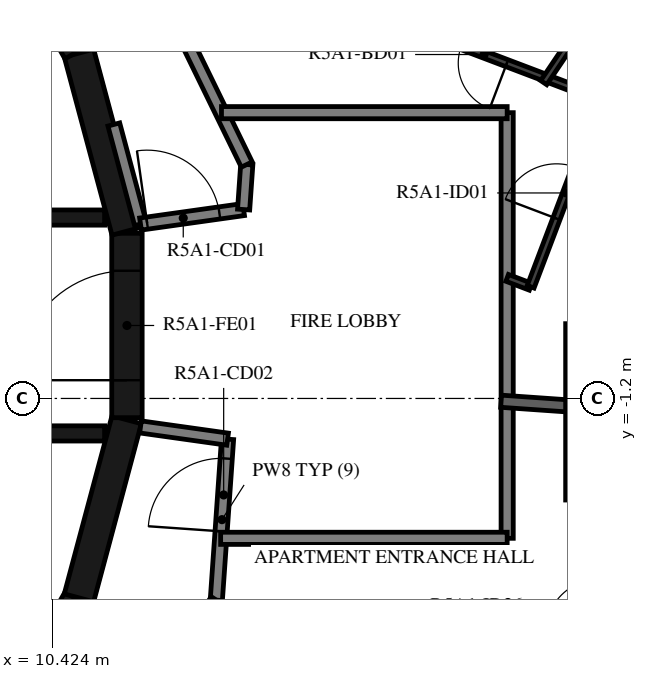
"""IFC4 building model, lengths in metres.
Left out: names, types, materials, properties, quantities, classifications, styles, units other than length and angle.
Written with IfcOpenShell. Run it as: python <this file> out.ifc"""

import sys

from ifc_helpers import new_model, si_unit, direction, frame, frame_2d, origin, place, context, subcontext, project, spatial, polyline, rectangle, outline, extrude, element, fill, save


model = new_model("IFC4")
c1 = context("Model", 3, precision=1e-05, world=origin(), true_north=direction((0.0, 1.0)))
c2 = subcontext(c1, "Body", "Model", "MODEL_VIEW")
j1 = project(units=[si_unit("LENGTHUNIT", "METRE"), si_unit("PLANEANGLEUNIT", "RADIAN")], contexts=[c1])
p1 = place(None, origin())
s1 = spatial("IfcSite", under=j1, at=p1, CompositionType="ELEMENT")
p2 = place(p1, origin())
s2 = spatial("IfcBuilding", under=s1, at=p2, CompositionType="ELEMENT")
p3 = place(p2, frame((0.0, 0.0, 191.9)))
s3 = spatial("IfcBuildingStorey", under=s2, at=p3, CompositionType="ELEMENT", Elevation=191.9)
for number, where, z_axis, x_axis in (
    (1, (9.329, -7.137, 0.0), (0.0, 0.0, 1.0), (0.5, 0.866, 0.0)),
    (2, (10.858, -4.479, 0.0), (0.0, 0.0, 1.0), (0.259, 0.966, 0.0)),
):
    element("IfcWall", number, at=place(p3, frame(where, z_axis=z_axis, x_axis=x_axis)), inside=s3, PredefinedType="SHEAR", context=c2, shape_type="SweptSolid", body=[
        extrude(rectangle(XDim=3.033, YDim=0.5, at=frame_2d((1.516, 0.0))), origin(), (0.0, 0.0, 1.0), 3.12),
    ])
p4 = place(p3, frame((11.647, -1.516, 0.0), z_axis=(0.0, 0.0, 1.0), x_axis=(0.0, 1.0, 0.0)))
e3 = element("IfcWall", 3, at=p4, inside=s3, PredefinedType="SHEAR", context=c2, shape_type="SweptSolid", body=[
    extrude(rectangle(XDim=3.033, YDim=0.5, at=frame_2d((1.516, 0.0))), origin(), (0.0, 0.0, 1.0), 3.12),
])
p5 = place(p4, frame((0.616, 0.0, 0.0)))
e4 = element("IfcOpeningElement", 4, at=p5, cuts=e3, PredefinedType="OPENING", context=c2, shape_type="SweptSolid", body=[
    extrude(rectangle(XDim=1.8, YDim=2.1, at=frame_2d((0.9, 1.05))), frame((0.0, 0.26, 0.0), z_axis=(0.0, -1.0, 0.0), x_axis=(1.0, 0.0, 0.0)), (0.0, 0.0, 1.0), 0.52),
])
for number, where, z_axis, x_axis in (
    (5, (11.643, 1.55, 0.0), (0.0, 0.0, 1.0), (-0.259, 0.966, 0.0)),
    (6, (10.845, 4.51, 0.0), (0.0, 0.0, 1.0), (-0.5, 0.866, 0.0)),
):
    element("IfcWall", number, at=place(p3, frame(where, z_axis=z_axis, x_axis=x_axis)), inside=s3, PredefinedType="SHEAR", context=c2, shape_type="SweptSolid", body=[
        extrude(rectangle(XDim=3.033, YDim=0.5, at=frame_2d((1.516, 0.0))), origin(), (0.0, 0.0, 1.0), 3.12),
    ])
p6 = place(p3, frame((3.35, 1.775, 0.0), z_axis=(0.0, 0.0, 1.0), x_axis=(1.0, 0.0, 0.0)))
e7 = element("IfcWall", 7, at=p6, inside=s3, PredefinedType="SHEAR", context=c2, shape_type="SweptSolid", body=[
    extrude(rectangle(XDim=7.93, YDim=0.25, at=frame_2d((3.965, 0.0))), origin(), (0.0, 0.0, 1.0), 3.12),
])
p7 = place(p6, frame((0.35, 0.0, 0.0)))
e8 = element("IfcOpeningElement", 8, at=p7, cuts=e7, PredefinedType="OPENING", context=c2, shape_type="SweptSolid", body=[
    extrude(rectangle(XDim=1.2, YDim=2.4, at=frame_2d((0.6, 1.2))), frame((0.0, 0.135, 0.0), z_axis=(0.0, -1.0, 0.0), x_axis=(1.0, 0.0, 0.0)), (0.0, 0.0, 1.0), 0.27),
])
p8 = place(p6, frame((2.5, 0.0, 0.0)))
e9 = element("IfcOpeningElement", 9, at=p8, cuts=e7, PredefinedType="OPENING", context=c2, shape_type="SweptSolid", body=[
    extrude(rectangle(XDim=1.2, YDim=2.4, at=frame_2d((0.6, 1.2))), frame((0.0, 0.135, 0.0), z_axis=(0.0, -1.0, 0.0), x_axis=(1.0, 0.0, 0.0)), (0.0, 0.0, 1.0), 0.27),
])
p9 = place(p6, frame((4.8, 0.0, 0.0)))
e10 = element("IfcOpeningElement", 10, at=p9, cuts=e7, PredefinedType="OPENING", context=c2, shape_type="SweptSolid", body=[
    extrude(rectangle(XDim=0.9, YDim=2.1, at=frame_2d((0.45, 1.05))), frame((0.0, 0.135, 0.0), z_axis=(0.0, -1.0, 0.0), x_axis=(1.0, 0.0, 0.0)), (0.0, 0.0, 1.0), 0.27),
])
p10 = place(p3, frame((3.35, -1.775, 0.0), z_axis=(0.0, 0.0, 1.0), x_axis=(1.0, 0.0, 0.0)))
e11 = element("IfcWall", 11, at=p10, inside=s3, PredefinedType="SHEAR", context=c2, shape_type="SweptSolid", body=[
    extrude(rectangle(XDim=7.93, YDim=0.25, at=frame_2d((3.965, 0.0))), origin(), (0.0, 0.0, 1.0), 3.12),
])
p11 = place(p10, frame((0.4, 0.0, 0.0)))
e12 = element("IfcOpeningElement", 12, at=p11, cuts=e11, PredefinedType="OPENING", context=c2, shape_type="SweptSolid", body=[
    extrude(rectangle(XDim=1.1, YDim=2.4, at=frame_2d((0.55, 1.2))), frame((0.0, 0.135, 0.0), z_axis=(0.0, -1.0, 0.0), x_axis=(1.0, 0.0, 0.0)), (0.0, 0.0, 1.0), 0.27),
])
p12 = place(p10, frame((2.55, 0.0, 0.0)))
e13 = element("IfcOpeningElement", 13, at=p12, cuts=e11, PredefinedType="OPENING", context=c2, shape_type="SweptSolid", body=[
    extrude(rectangle(XDim=1.1, YDim=2.4, at=frame_2d((0.55, 1.2))), frame((0.0, 0.135, 0.0), z_axis=(0.0, -1.0, 0.0), x_axis=(1.0, 0.0, 0.0)), (0.0, 0.0, 1.0), 0.27),
])
p13 = place(p10, frame((4.7, 0.0, 0.0)))
e14 = element("IfcOpeningElement", 14, at=p13, cuts=e11, PredefinedType="OPENING", context=c2, shape_type="SweptSolid", body=[
    extrude(rectangle(XDim=1.1, YDim=2.4, at=frame_2d((0.55, 1.2))), frame((0.0, 0.135, 0.0), z_axis=(0.0, -1.0, 0.0), x_axis=(1.0, 0.0, 0.0)), (0.0, 0.0, 1.0), 0.27),
])
p14 = place(p3, frame((11.87, 1.668, 0.0), z_axis=(0.0, 0.0, 1.0), x_axis=(-0.258836880648, 0.965921047093, 0.0)))
e15 = element("IfcWall", 15, at=p14, inside=s3, PredefinedType="STANDARD", context=c2, shape_type="SweptSolid", body=[
    extrude(rectangle(XDim=1.695, YDim=0.2, at=frame_2d((0.848, 0.0))), origin(), (0.0, 0.0, 1.0), 3.12),
])
p15 = place(p3, frame((11.87, 1.668, 0.0), z_axis=(0.0, 0.0, 1.0), x_axis=(0.990271931984, 0.139145609792, 0.0)))
e16 = element("IfcWall", 16, at=p15, inside=s3, PredefinedType="STANDARD", context=c2, shape_type="SweptSolid", body=[
    extrude(rectangle(XDim=1.712, YDim=0.2, at=frame_2d((0.856, 0.0))), origin(), (0.0, 0.0, 1.0), 3.12),
])
p16 = place(p15, frame((0.11, 0.0, 0.0)))
e17 = element("IfcOpeningElement", 17, at=p16, cuts=e16, PredefinedType="OPENING", context=c2, shape_type="SweptSolid", body=[
    extrude(rectangle(XDim=1.2, YDim=2.1, at=frame_2d((0.6, 1.05))), frame((0.0, 0.11, 0.0), z_axis=(0.0, -1.0, 0.0), x_axis=(1.0, 0.0, 0.0)), (0.0, 0.0, 1.0), 0.22),
])
p17 = place(p3, frame((13.566, 1.906, 0.0), z_axis=(0.0, 0.0, 1.0), x_axis=(0.07005495793, 0.997543133338, 0.0)))
e18 = element("IfcWall", 18, at=p17, inside=s3, PredefinedType="STANDARD", context=c2, shape_type="SweptSolid", body=[
    extrude(rectangle(XDim=0.742, YDim=0.2, at=frame_2d((0.371, 0.0))), origin(), (0.0, 0.0, 1.0), 3.12),
])
p18 = place(p3, frame((13.618, 2.647, 0.0), z_axis=(0.0, 0.0, 1.0), x_axis=(-0.438366026218, 0.898796543751, 0.0)))
e19 = element("IfcWall", 19, at=p18, inside=s3, PredefinedType="STANDARD", context=c2, shape_type="SweptSolid", body=[
    extrude(rectangle(XDim=7.181, YDim=0.2, at=frame_2d((3.591, 0.0))), origin(), (0.0, 0.0, 1.0), 3.12),
])
p19 = place(p3, frame((13.117, -4.517, 0.0), z_axis=(0.0, 0.0, 1.0), x_axis=(0.069736659613, 0.997565435601, 0.0)))
e20 = element("IfcWall", 20, at=p19, inside=s3, PredefinedType="STANDARD", context=c2, shape_type="SweptSolid", body=[
    extrude(rectangle(XDim=2.654, YDim=0.2, at=frame_2d((1.327, 0.0))), origin(), (0.0, 0.0, 1.0), 3.12),
])
p20 = place(p19, frame((1.134, 0.0, 0.0)))
e21 = element("IfcOpeningElement", 21, at=p20, cuts=e20, PredefinedType="OPENING", context=c2, shape_type="SweptSolid", body=[
    extrude(rectangle(XDim=1.2, YDim=2.1, at=frame_2d((0.6, 1.05))), frame((0.0, 0.11, 0.0), z_axis=(0.0, -1.0, 0.0), x_axis=(1.0, 0.0, 0.0)), (0.0, 0.0, 1.0), 0.22),
])
p21 = place(p3, frame((13.302, -1.869, 0.0), z_axis=(0.0, 0.0, 1.0), x_axis=(-0.990274397042, 0.13912806533, 0.0)))
e22 = element("IfcWall", 22, at=p21, inside=s3, PredefinedType="STANDARD", context=c2, shape_type="SweptSolid", body=[
    extrude(rectangle(XDim=1.446, YDim=0.2, at=frame_2d((0.723, 0.0))), origin(), (0.0, 0.0, 1.0), 3.12),
])
p22 = place(p3, frame((9.101, -10.47, 0.0), z_axis=(0.0, 0.0, 1.0), x_axis=(0.559195469534, 0.829035841718, 0.0)))
e23 = element("IfcWall", 23, at=p22, inside=s3, PredefinedType="STANDARD", context=c2, shape_type="SweptSolid", body=[
    extrude(rectangle(XDim=7.181, YDim=0.2, at=frame_2d((3.591, 0.0))), origin(), (0.0, 0.0, 1.0), 3.12),
])
p23 = place(p3, frame((17.9, -3.5, 0.0), z_axis=(0.0, 0.0, 1.0), x_axis=(0.0, 1.0, 0.0)))
e24 = element("IfcWall", 24, at=p23, inside=s3, PredefinedType="STANDARD", context=c2, shape_type="SweptSolid", body=[
    extrude(rectangle(XDim=7.0, YDim=0.2, at=frame_2d((3.5, 0.0))), origin(), (0.0, 0.0, 1.0), 3.12),
])
p24 = place(p3, frame((17.9, 3.5, 0.0), z_axis=(0.0, 0.0, 1.0), x_axis=(-1.0, 0.0, 0.0)))
e25 = element("IfcWall", 25, at=p24, inside=s3, PredefinedType="STANDARD", context=c2, shape_type="SweptSolid", body=[
    extrude(rectangle(XDim=4.698, YDim=0.2, at=frame_2d((2.349, 0.0))), origin(), (0.0, 0.0, 1.0), 3.12),
])
p25 = place(p3, frame((13.188, -3.5, 0.0), z_axis=(0.0, 0.0, 1.0), x_axis=(1.0, 0.0, 0.0)))
e26 = element("IfcWall", 26, at=p25, inside=s3, PredefinedType="STANDARD", context=c2, shape_type="SweptSolid", body=[
    extrude(rectangle(XDim=4.712, YDim=0.2, at=frame_2d((2.356, 0.0))), origin(), (0.0, 0.0, 1.0), 3.12),
])
p26 = place(p3, frame((17.8, -1.246, 0.0), z_axis=(0.0, 0.0, 1.0), x_axis=(0.997562681713, -0.069776042122, 0.0)))
e27 = element("IfcWall", 27, at=p26, inside=s3, PredefinedType="STANDARD", context=c2, shape_type="SweptSolid", body=[
    extrude(rectangle(XDim=1.144, YDim=0.2, at=frame_2d((0.572, 0.0))), origin(), (0.0, 0.0, 1.0), 3.12),
])
p27 = place(p3, frame((17.9, 0.783, 0.0), z_axis=(0.0, 0.0, 1.0), x_axis=(0.93513272442, -0.354297597677, 0.0)))
e28 = element("IfcWall", 28, at=p27, inside=s3, PredefinedType="PARTITIONING", context=c2, shape_type="SweptSolid", body=[
    extrude(rectangle(XDim=0.413, YDim=0.12, at=frame_2d((0.207, 0.0))), origin(), (0.0, 0.0, 1.0), 3.12),
])
p28 = place(p3, frame((18.286, 0.637, 0.0), z_axis=(0.0, 0.0, 1.0), x_axis=(0.354672075988, 0.934990758518, 0.0)))
e29 = element("IfcWall", 29, at=p28, inside=s3, PredefinedType="PARTITIONING", context=c2, shape_type="SweptSolid", body=[
    extrude(rectangle(XDim=3.3, YDim=0.12, at=frame_2d((1.65, 0.0))), origin(), (0.0, 0.0, 1.0), 3.12),
])
p29 = place(p28, frame((1.2, 0.0, 0.0)))
e30 = element("IfcOpeningElement", 30, at=p29, cuts=e29, PredefinedType="OPENING", context=c2, shape_type="SweptSolid", body=[
    extrude(rectangle(XDim=0.9, YDim=2.1, at=frame_2d((0.45, 1.05))), frame((0.0, 0.07, 0.0), z_axis=(0.0, -1.0, 0.0), x_axis=(1.0, 0.0, 0.0)), (0.0, 0.0, 1.0), 0.14),
])
p30 = place(p3, frame((19.456, 3.722, 0.0), z_axis=(0.0, 0.0, 1.0), x_axis=(-0.935017484321, 0.3546016131, 0.0)))
e31 = element("IfcWall", 31, at=p30, inside=s3, PredefinedType="PARTITIONING", context=c2, shape_type="SweptSolid", body=[
    extrude(rectangle(XDim=5.734, YDim=0.12, at=frame_2d((2.867, 0.0))), origin(), (0.0, 0.0, 1.0), 3.12),
])
p31 = place(p30, frame((1.669, 0.0, 0.0)))
e32 = element("IfcOpeningElement", 32, at=p31, cuts=e31, PredefinedType="OPENING", context=c2, shape_type="SweptSolid", body=[
    extrude(rectangle(XDim=0.8, YDim=2.1, at=frame_2d((0.4, 1.05))), frame((0.0, 0.07, 0.0), z_axis=(0.0, -1.0, 0.0), x_axis=(1.0, 0.0, 0.0)), (0.0, 0.0, 1.0), 0.14),
])
p32 = place(p3, frame((22.598, 2.345, 0.0), z_axis=(0.0, 0.0, 1.0), x_axis=(-0.829034113947, 0.559198031034, 0.0)))
e33 = element("IfcWall", 33, at=p32, inside=s3, PredefinedType="PARTITIONING", context=c2, shape_type="SweptSolid", body=[
    extrude(rectangle(XDim=12.879, YDim=0.12, at=frame_2d((6.439, 0.0))), origin(), (0.0, 0.0, 1.0), 3.12),
])
p33 = place(p32, frame((0.2, 0.0, 0.0)))
e34 = element("IfcOpeningElement", 34, at=p33, cuts=e33, PredefinedType="OPENING", context=c2, shape_type="SweptSolid", body=[
    extrude(rectangle(XDim=0.9, YDim=2.1, at=frame_2d((0.45, 1.05))), frame((0.0, 0.07, 0.0), z_axis=(0.0, -1.0, 0.0), x_axis=(1.0, 0.0, 0.0)), (0.0, 0.0, 1.0), 0.14),
])
p34 = place(p3, frame((19.067, 4.832, 0.0), z_axis=(0.0, 0.0, 1.0), x_axis=(-0.559257363459, -0.828994090098, 0.0)))
e35 = element("IfcWall", 35, at=p34, inside=s3, PredefinedType="PARTITIONING", context=c2, shape_type="SweptSolid", body=[
    extrude(rectangle(XDim=1.012, YDim=0.12, at=frame_2d((0.506, 0.0))), origin(), (0.0, 0.0, 1.0), 3.12),
])
p35 = place(p3, origin())
e36 = element("IfcWall", 36, at=p35, inside=s3, PredefinedType="STANDARD", context=c2, shape_type="SweptSolid", body=[
    extrude(outline(polyline([(21.762, 0.03), (21.762, -2.87), (18.862, -2.87), (18.862, 0.03), (21.762, 0.03)]), holes=[polyline([(19.062, -2.67), (21.562, -2.67), (21.562, -0.17), (19.062, -0.17), (19.062, -2.67)])]), origin(), (0.0, 0.0, 1.0), 3.12),
])
p36 = place(p5, origin())
e37 = element("IfcDoor", 37, at=p36, inside=s3, OperationType="DOUBLE_DOOR_SINGLE_SWING", PredefinedType="DOOR", context=c2, shape_type="SweptSolid", body=[
    extrude(rectangle(XDim=1.8, YDim=2.1, at=frame_2d((0.9, 1.05))), frame((0.0, 0.025, 0.0), z_axis=(0.0, -1.0, 0.0), x_axis=(1.0, 0.0, 0.0)), (0.0, 0.0, 1.0), 0.05),
])
fill(e4, e37)
p37 = place(p29, origin())
e38 = element("IfcDoor", 38, at=p37, inside=s3, OperationType="SINGLE_SWING_LEFT", PredefinedType="DOOR", context=c2, shape_type="SweptSolid", body=[
    extrude(rectangle(XDim=0.9, YDim=2.1, at=frame_2d((0.45, 1.05))), frame((0.0, 0.025, 0.0), z_axis=(0.0, -1.0, 0.0), x_axis=(1.0, 0.0, 0.0)), (0.0, 0.0, 1.0), 0.05),
])
fill(e30, e38)
p38 = place(p31, origin())
e39 = element("IfcDoor", 39, at=p38, inside=s3, OperationType="SINGLE_SWING_LEFT", PredefinedType="DOOR", context=c2, shape_type="SweptSolid", body=[
    extrude(rectangle(XDim=0.8, YDim=2.1, at=frame_2d((0.4, 1.05))), frame((0.0, 0.025, 0.0), z_axis=(0.0, -1.0, 0.0), x_axis=(1.0, 0.0, 0.0)), (0.0, 0.0, 1.0), 0.05),
])
fill(e32, e39)
p39 = place(p16, origin())
e40 = element("IfcDoor", 40, at=p39, inside=s3, OperationType="DOUBLE_DOOR_SINGLE_SWING", PredefinedType="DOOR", context=c2, shape_type="SweptSolid", body=[
    extrude(rectangle(XDim=1.2, YDim=2.1, at=frame_2d((0.6, 1.05))), frame((0.0, 0.025, 0.0), z_axis=(0.0, -1.0, 0.0), x_axis=(1.0, 0.0, 0.0)), (0.0, 0.0, 1.0), 0.05),
])
fill(e17, e40)
p40 = place(p20, origin())
e41 = element("IfcDoor", 41, at=p40, inside=s3, OperationType="DOUBLE_DOOR_SINGLE_SWING", PredefinedType="DOOR", context=c2, shape_type="SweptSolid", body=[
    extrude(rectangle(XDim=1.2, YDim=2.1, at=frame_2d((0.6, 1.05))), frame((0.0, 0.025, 0.0), z_axis=(0.0, -1.0, 0.0), x_axis=(1.0, 0.0, 0.0)), (0.0, 0.0, 1.0), 0.05),
])
fill(e21, e41)
save(model, sys.argv[1])
